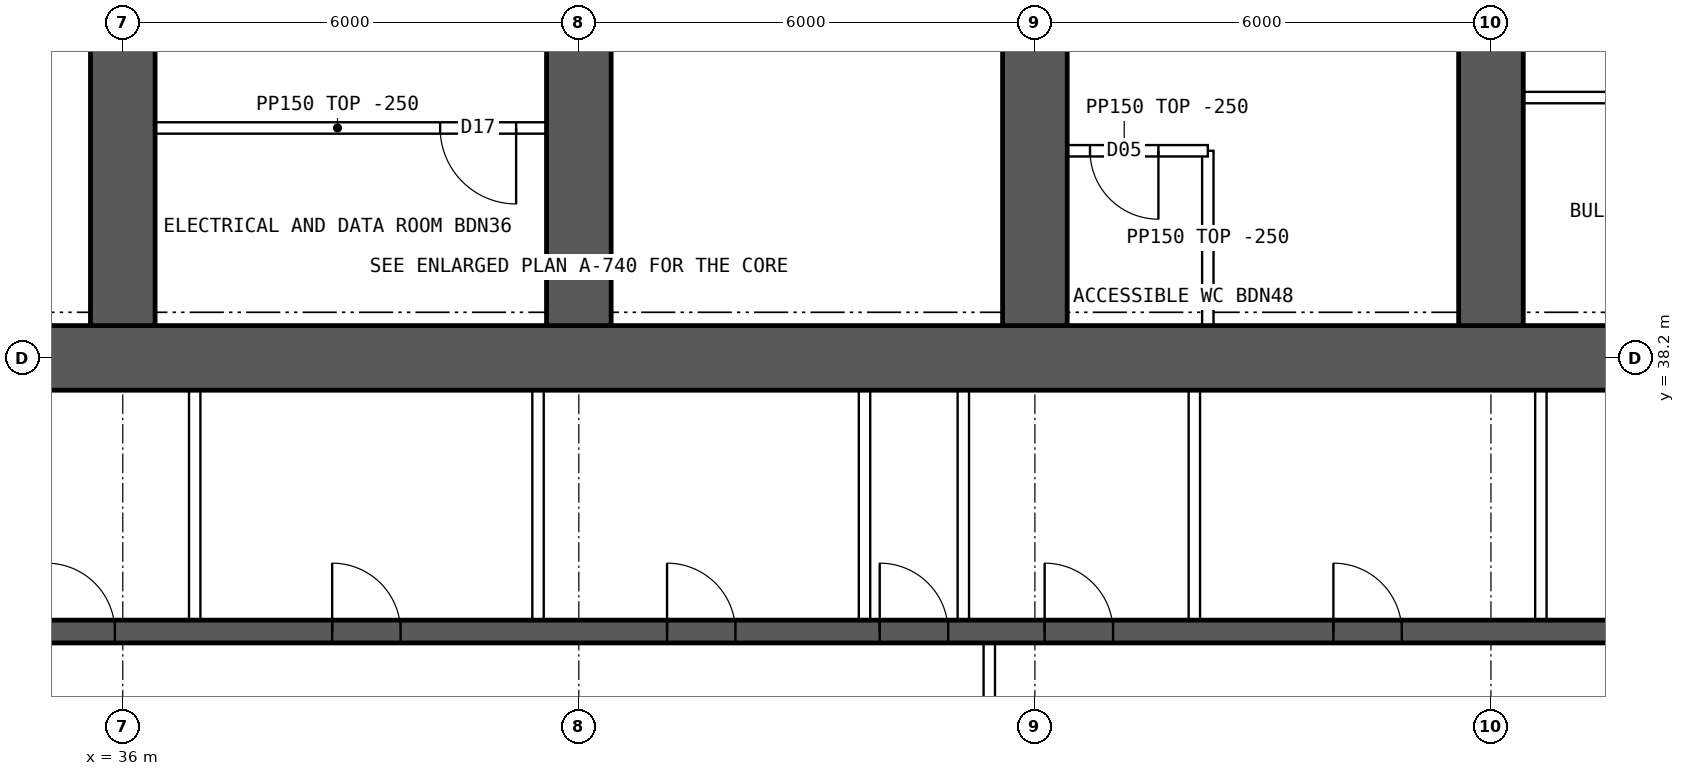
"""IFC4 building model, lengths in metres.
Left out: names, types, materials, properties, quantities, classifications, styles, units other than length and angle.
Written with IfcOpenShell. Run it as: python <this file> out.ifc"""

import sys

from ifc_helpers import new_model, si_unit, direction, frame, frame_2d, origin, place, context, subcontext, project, spatial, rectangle, extrude, element, fill, save


model = new_model("IFC4")
c1 = context("Model", 3, precision=1e-05, world=origin(), true_north=direction((0.0, 1.0)))
c2 = subcontext(c1, "Body", "Model", "MODEL_VIEW")
j1 = project(units=[si_unit("LENGTHUNIT", "METRE"), si_unit("PLANEANGLEUNIT", "RADIAN")], contexts=[c1])
p1 = place(None, origin())
s1 = spatial("IfcSite", under=j1, at=p1, CompositionType="ELEMENT")
p2 = place(p1, origin())
s2 = spatial("IfcBuilding", under=s1, at=p2, CompositionType="ELEMENT")
p3 = place(p2, frame((0.0, 0.0, 152.35)))
s3 = spatial("IfcBuildingStorey", under=s2, at=p3, CompositionType="ELEMENT", Elevation=152.35)
p4 = place(p3, frame((18.0, 38.2, 0.0), z_axis=(0.0, 0.0, 1.0), x_axis=(1.0, 0.0, 0.0)))
e1 = element("IfcWall", 1, at=p4, inside=s3, PredefinedType="SHEAR", context=c2, shape_type="SweptSolid", body=[
    extrude(rectangle(XDim=48.0, YDim=0.85, at=frame_2d((24.0, 0.0))), origin(), (0.0, 0.0, 1.0), 3.75),
])
p5 = place(p3, frame((18.425, 34.6, 0.0), z_axis=(0.0, 0.0, 1.0), x_axis=(1.0, 0.0, 0.0)))
e2 = element("IfcWall", 2, at=p5, inside=s3, PredefinedType="SHEAR", context=c2, shape_type="SweptSolid", body=[
    extrude(rectangle(XDim=47.15, YDim=0.3, at=frame_2d((23.575, 0.0))), origin(), (0.0, 0.0, 1.0), 3.75),
])
p6 = place(p5, frame((0.9, 0.0, 0.0)))
e3 = element("IfcOpeningElement", 3, at=p6, cuts=e2, PredefinedType="OPENING", context=c2, shape_type="SweptSolid", body=[
    extrude(rectangle(XDim=1.1, YDim=2.1, at=frame_2d((0.55, 1.05))), frame((0.0, 0.16, 0.0), z_axis=(0.0, -1.0, 0.0), x_axis=(1.0, 0.0, 0.0)), (0.0, 0.0, 1.0), 0.32),
])
p7 = place(p5, frame((45.15, 0.0, 0.0)))
e4 = element("IfcOpeningElement", 4, at=p7, cuts=e2, PredefinedType="OPENING", context=c2, shape_type="SweptSolid", body=[
    extrude(rectangle(XDim=1.1, YDim=2.1, at=frame_2d((0.55, 1.05))), frame((0.0, 0.16, 0.0), z_axis=(0.0, -1.0, 0.0), x_axis=(1.0, 0.0, 0.0)), (0.0, 0.0, 1.0), 0.32),
])
p8 = place(p5, frame((4.175, 0.0, 0.0)))
e5 = element("IfcOpeningElement", 5, at=p8, cuts=e2, PredefinedType="OPENING", context=c2, shape_type="SweptSolid", body=[
    extrude(rectangle(XDim=0.9, YDim=2.1, at=frame_2d((0.45, 1.05))), frame((0.0, 0.16, 0.0), z_axis=(0.0, -1.0, 0.0), x_axis=(1.0, 0.0, 0.0)), (0.0, 0.0, 1.0), 0.32),
])
p9 = place(p5, frame((42.075, 0.0, 0.0)))
e6 = element("IfcOpeningElement", 6, at=p9, cuts=e2, PredefinedType="OPENING", context=c2, shape_type="SweptSolid", body=[
    extrude(rectangle(XDim=0.9, YDim=2.1, at=frame_2d((0.45, 1.05))), frame((0.0, 0.16, 0.0), z_axis=(0.0, -1.0, 0.0), x_axis=(1.0, 0.0, 0.0)), (0.0, 0.0, 1.0), 0.32),
])
p10 = place(p5, frame((8.95, 0.0, 0.0)))
e7 = element("IfcOpeningElement", 7, at=p10, cuts=e2, PredefinedType="OPENING", context=c2, shape_type="SweptSolid", body=[
    extrude(rectangle(XDim=0.9, YDim=2.1, at=frame_2d((0.45, 1.05))), frame((0.0, 0.16, 0.0), z_axis=(0.0, -1.0, 0.0), x_axis=(1.0, 0.0, 0.0)), (0.0, 0.0, 1.0), 0.32),
])
p11 = place(p5, frame((12.924, 0.0, 0.0)))
e8 = element("IfcOpeningElement", 8, at=p11, cuts=e2, PredefinedType="OPENING", context=c2, shape_type="SweptSolid", body=[
    extrude(rectangle(XDim=0.9, YDim=2.1, at=frame_2d((0.45, 1.05))), frame((0.0, 0.16, 0.0), z_axis=(0.0, -1.0, 0.0), x_axis=(1.0, 0.0, 0.0)), (0.0, 0.0, 1.0), 0.32),
])
p12 = place(p5, frame((16.571, 0.0, 0.0)))
e9 = element("IfcOpeningElement", 9, at=p12, cuts=e2, PredefinedType="OPENING", context=c2, shape_type="SweptSolid", body=[
    extrude(rectangle(XDim=0.9, YDim=2.1, at=frame_2d((0.45, 1.05))), frame((0.0, 0.16, 0.0), z_axis=(0.0, -1.0, 0.0), x_axis=(1.0, 0.0, 0.0)), (0.0, 0.0, 1.0), 0.32),
])
p13 = place(p5, frame((20.33, 0.0, 0.0)))
e10 = element("IfcOpeningElement", 10, at=p13, cuts=e2, PredefinedType="OPENING", context=c2, shape_type="SweptSolid", body=[
    extrude(rectangle(XDim=0.9, YDim=2.1, at=frame_2d((0.45, 1.05))), frame((0.0, 0.16, 0.0), z_axis=(0.0, -1.0, 0.0), x_axis=(1.0, 0.0, 0.0)), (0.0, 0.0, 1.0), 0.32),
])
p14 = place(p5, frame((24.736, 0.0, 0.0)))
e11 = element("IfcOpeningElement", 11, at=p14, cuts=e2, PredefinedType="OPENING", context=c2, shape_type="SweptSolid", body=[
    extrude(rectangle(XDim=0.9, YDim=2.1, at=frame_2d((0.45, 1.05))), frame((0.0, 0.16, 0.0), z_axis=(0.0, -1.0, 0.0), x_axis=(1.0, 0.0, 0.0)), (0.0, 0.0, 1.0), 0.32),
])
p15 = place(p5, frame((27.533, 0.0, 0.0)))
e12 = element("IfcOpeningElement", 12, at=p15, cuts=e2, PredefinedType="OPENING", context=c2, shape_type="SweptSolid", body=[
    extrude(rectangle(XDim=0.9, YDim=2.1, at=frame_2d((0.45, 1.05))), frame((0.0, 0.16, 0.0), z_axis=(0.0, -1.0, 0.0), x_axis=(1.0, 0.0, 0.0)), (0.0, 0.0, 1.0), 0.32),
])
p16 = place(p5, frame((29.703, 0.0, 0.0)))
e13 = element("IfcOpeningElement", 13, at=p16, cuts=e2, PredefinedType="OPENING", context=c2, shape_type="SweptSolid", body=[
    extrude(rectangle(XDim=0.9, YDim=2.1, at=frame_2d((0.45, 1.05))), frame((0.0, 0.16, 0.0), z_axis=(0.0, -1.0, 0.0), x_axis=(1.0, 0.0, 0.0)), (0.0, 0.0, 1.0), 0.32),
])
p17 = place(p5, frame((33.502, 0.0, 0.0)))
e14 = element("IfcOpeningElement", 14, at=p17, cuts=e2, PredefinedType="OPENING", context=c2, shape_type="SweptSolid", body=[
    extrude(rectangle(XDim=0.9, YDim=2.1, at=frame_2d((0.45, 1.05))), frame((0.0, 0.16, 0.0), z_axis=(0.0, -1.0, 0.0), x_axis=(1.0, 0.0, 0.0)), (0.0, 0.0, 1.0), 0.32),
])
p18 = place(p5, frame((37.453, 0.0, 0.0)))
e15 = element("IfcOpeningElement", 15, at=p18, cuts=e2, PredefinedType="OPENING", context=c2, shape_type="SweptSolid", body=[
    extrude(rectangle(XDim=0.9, YDim=2.1, at=frame_2d((0.45, 1.05))), frame((0.0, 0.16, 0.0), z_axis=(0.0, -1.0, 0.0), x_axis=(1.0, 0.0, 0.0)), (0.0, 0.0, 1.0), 0.32),
])
for number, where, z_axis, x_axis in (
    (16, (36.0, 38.625, 0.0), (0.0, 0.0, 1.0), (0.0, 1.0, 0.0)),
    (17, (42.0, 38.625, 0.0), (0.0, 0.0, 1.0), (0.0, 1.0, 0.0)),
    (18, (48.0, 38.625, 0.0), (0.0, 0.0, 1.0), (0.0, 1.0, 0.0)),
    (19, (54.0, 38.625, 0.0), (0.0, 0.0, 1.0), (0.0, 1.0, 0.0)),
):
    element("IfcWall", number, at=place(p3, frame(where, z_axis=z_axis, x_axis=x_axis)), inside=s3, PredefinedType="SHEAR", context=c2, shape_type="SweptSolid", body=[
        extrude(rectangle(XDim=8.175, YDim=0.85, at=frame_2d((4.087, 0.0))), origin(), (0.0, 0.0, 1.0), 3.75),
    ])
p19 = place(p3, frame((47.4, 30.55, 0.0), z_axis=(0.0, 0.0, 1.0), x_axis=(0.0, 1.0, 0.0)))
e20 = element("IfcWall", 20, at=p19, inside=s3, PredefinedType="SOLIDWALL", context=c2, shape_type="SweptSolid", body=[
    extrude(rectangle(XDim=3.9, YDim=0.15, at=frame_2d((1.95, 0.0))), origin(), (0.0, 0.0, 1.0), 3.5),
])
p20 = place(p19, frame((1.15, 0.0, 0.0)))
e21 = element("IfcOpeningElement", 21, at=p20, cuts=e20, PredefinedType="OPENING", context=c2, shape_type="SweptSolid", body=[
    extrude(rectangle(XDim=1.6, YDim=2.1, at=frame_2d((0.8, 1.05))), frame((0.0, 0.085, 0.0), z_axis=(0.0, -1.0, 0.0), x_axis=(1.0, 0.0, 0.0)), (0.0, 0.0, 1.0), 0.17),
])
for number, where, z_axis, x_axis in (
    (22, (36.946, 34.75, 0.0), (0.0, 0.0, 1.0), (0.0, 1.0, 0.0)),
    (23, (41.463, 34.75, 0.0), (0.0, 0.0, 1.0), (0.0, 1.0, 0.0)),
    (24, (45.758, 34.75, 0.0), (0.0, 0.0, 1.0), (0.0, 1.0, 0.0)),
    (25, (47.058, 34.75, 0.0), (0.0, 0.0, 1.0), (0.0, 1.0, 0.0)),
    (26, (50.098, 34.75, 0.0), (0.0, 0.0, 1.0), (0.0, 1.0, 0.0)),
    (27, (54.657, 34.75, 0.0), (0.0, 0.0, 1.0), (0.0, 1.0, 0.0)),
):
    element("IfcWall", number, at=place(p3, frame(where, z_axis=z_axis, x_axis=x_axis)), inside=s3, PredefinedType="SOLIDWALL", context=c2, shape_type="SweptSolid", body=[
        extrude(rectangle(XDim=3.025, YDim=0.15, at=frame_2d((1.512, 0.0))), origin(), (0.0, 0.0, 1.0), 3.5),
    ])
p21 = place(p3, frame((41.575, 41.225, 0.0), z_axis=(0.0, 0.0, 1.0), x_axis=(-1.0, 0.0, 0.0)))
e28 = element("IfcWall", 28, at=p21, inside=s3, PredefinedType="PARTITIONING", context=c2, shape_type="SweptSolid", body=[
    extrude(rectangle(XDim=5.5, YDim=0.15, at=frame_2d((2.75, 0.0))), origin(), (0.0, 0.0, 1.0), 3.5),
])
p22 = place(p21, frame((0.4, 0.0, 0.0)))
e29 = element("IfcOpeningElement", 29, at=p22, cuts=e28, PredefinedType="OPENING", context=c2, shape_type="SweptSolid", body=[
    extrude(rectangle(XDim=1.0, YDim=2.1, at=frame_2d((0.5, 1.05))), frame((0.0, 0.085, 0.0), z_axis=(0.0, -1.0, 0.0), x_axis=(1.0, 0.0, 0.0)), (0.0, 0.0, 1.0), 0.17),
])
p23 = place(p3, frame((50.275, 40.925, 0.0), z_axis=(0.0, 0.0, 1.0), x_axis=(0.0, -1.0, 0.0)))
e30 = element("IfcWall", 30, at=p23, inside=s3, PredefinedType="PARTITIONING", context=c2, shape_type="SweptSolid", body=[
    extrude(rectangle(XDim=2.3, YDim=0.15, at=frame_2d((1.15, 0.0))), origin(), (0.0, 0.0, 1.0), 3.5),
])
p24 = place(p3, frame((50.275, 40.925, 0.0), z_axis=(0.0, 0.0, 1.0), x_axis=(-1.0, 0.0, 0.0)))
e31 = element("IfcWall", 31, at=p24, inside=s3, PredefinedType="PARTITIONING", context=c2, shape_type="SweptSolid", body=[
    extrude(rectangle(XDim=2.2, YDim=0.15, at=frame_2d((1.1, 0.0))), origin(), (0.0, 0.0, 1.0), 3.5),
])
p25 = place(p24, frame((0.65, 0.0, 0.0)))
e32 = element("IfcOpeningElement", 32, at=p25, cuts=e31, PredefinedType="OPENING", context=c2, shape_type="SweptSolid", body=[
    extrude(rectangle(XDim=0.9, YDim=2.1, at=frame_2d((0.45, 1.05))), frame((0.0, 0.085, 0.0), z_axis=(0.0, -1.0, 0.0), x_axis=(1.0, 0.0, 0.0)), (0.0, 0.0, 1.0), 0.17),
])
p26 = place(p3, frame((59.925, 41.625, 0.0), z_axis=(0.0, 0.0, 1.0), x_axis=(-1.0, 0.0, 0.0)))
e33 = element("IfcWall", 33, at=p26, inside=s3, PredefinedType="PARTITIONING", context=c2, shape_type="SweptSolid", body=[
    extrude(rectangle(XDim=5.5, YDim=0.15, at=frame_2d((2.75, 0.0))), origin(), (0.0, 0.0, 1.0), 3.5),
])
p27 = place(p26, frame((0.4, 0.0, 0.0)))
e34 = element("IfcOpeningElement", 34, at=p27, cuts=e33, PredefinedType="OPENING", context=c2, shape_type="SweptSolid", body=[
    extrude(rectangle(XDim=1.0, YDim=2.1, at=frame_2d((0.5, 1.05))), frame((0.0, 0.085, 0.0), z_axis=(0.0, -1.0, 0.0), x_axis=(1.0, 0.0, 0.0)), (0.0, 0.0, 1.0), 0.17),
])
p28 = place(p12, origin())
e35 = element("IfcDoor", 35, at=p28, inside=s3, OperationType="SINGLE_SWING_LEFT", PredefinedType="DOOR", context=c2, shape_type="SweptSolid", body=[
    extrude(rectangle(XDim=0.9, YDim=2.1, at=frame_2d((0.45, 1.05))), frame((0.0, 0.025, 0.0), z_axis=(0.0, -1.0, 0.0), x_axis=(1.0, 0.0, 0.0)), (0.0, 0.0, 1.0), 0.05),
])
fill(e9, e35)
p29 = place(p13, origin())
e36 = element("IfcDoor", 36, at=p29, inside=s3, OperationType="SINGLE_SWING_LEFT", PredefinedType="DOOR", context=c2, shape_type="SweptSolid", body=[
    extrude(rectangle(XDim=0.9, YDim=2.1, at=frame_2d((0.45, 1.05))), frame((0.0, 0.025, 0.0), z_axis=(0.0, -1.0, 0.0), x_axis=(1.0, 0.0, 0.0)), (0.0, 0.0, 1.0), 0.05),
])
fill(e10, e36)
p30 = place(p14, origin())
e37 = element("IfcDoor", 37, at=p30, inside=s3, OperationType="SINGLE_SWING_LEFT", PredefinedType="DOOR", context=c2, shape_type="SweptSolid", body=[
    extrude(rectangle(XDim=0.9, YDim=2.1, at=frame_2d((0.45, 1.05))), frame((0.0, 0.025, 0.0), z_axis=(0.0, -1.0, 0.0), x_axis=(1.0, 0.0, 0.0)), (0.0, 0.0, 1.0), 0.05),
])
fill(e11, e37)
p31 = place(p15, origin())
e38 = element("IfcDoor", 38, at=p31, inside=s3, OperationType="SINGLE_SWING_LEFT", PredefinedType="DOOR", context=c2, shape_type="SweptSolid", body=[
    extrude(rectangle(XDim=0.9, YDim=2.1, at=frame_2d((0.45, 1.05))), frame((0.0, 0.025, 0.0), z_axis=(0.0, -1.0, 0.0), x_axis=(1.0, 0.0, 0.0)), (0.0, 0.0, 1.0), 0.05),
])
fill(e12, e38)
p32 = place(p16, origin())
e39 = element("IfcDoor", 39, at=p32, inside=s3, OperationType="SINGLE_SWING_LEFT", PredefinedType="DOOR", context=c2, shape_type="SweptSolid", body=[
    extrude(rectangle(XDim=0.9, YDim=2.1, at=frame_2d((0.45, 1.05))), frame((0.0, 0.025, 0.0), z_axis=(0.0, -1.0, 0.0), x_axis=(1.0, 0.0, 0.0)), (0.0, 0.0, 1.0), 0.05),
])
fill(e13, e39)
p33 = place(p17, origin())
e40 = element("IfcDoor", 40, at=p33, inside=s3, OperationType="SINGLE_SWING_LEFT", PredefinedType="DOOR", context=c2, shape_type="SweptSolid", body=[
    extrude(rectangle(XDim=0.9, YDim=2.1, at=frame_2d((0.45, 1.05))), frame((0.0, 0.025, 0.0), z_axis=(0.0, -1.0, 0.0), x_axis=(1.0, 0.0, 0.0)), (0.0, 0.0, 1.0), 0.05),
])
fill(e14, e40)
p34 = place(p22, origin())
e41 = element("IfcDoor", 41, at=p34, inside=s3, OperationType="SINGLE_SWING_LEFT", PredefinedType="DOOR", context=c2, shape_type="SweptSolid", body=[
    extrude(rectangle(XDim=1.0, YDim=2.1, at=frame_2d((0.5, 1.05))), frame((0.0, 0.025, 0.0), z_axis=(0.0, -1.0, 0.0), x_axis=(1.0, 0.0, 0.0)), (0.0, 0.0, 1.0), 0.05),
])
fill(e29, e41)
p35 = place(p25, origin())
e42 = element("IfcDoor", 42, at=p35, inside=s3, OperationType="SINGLE_SWING_LEFT", PredefinedType="DOOR", context=c2, shape_type="SweptSolid", body=[
    extrude(rectangle(XDim=0.9, YDim=2.1, at=frame_2d((0.45, 1.05))), frame((0.0, 0.025, 0.0), z_axis=(0.0, -1.0, 0.0), x_axis=(1.0, 0.0, 0.0)), (0.0, 0.0, 1.0), 0.05),
])
fill(e32, e42)
save(model, sys.argv[1])
